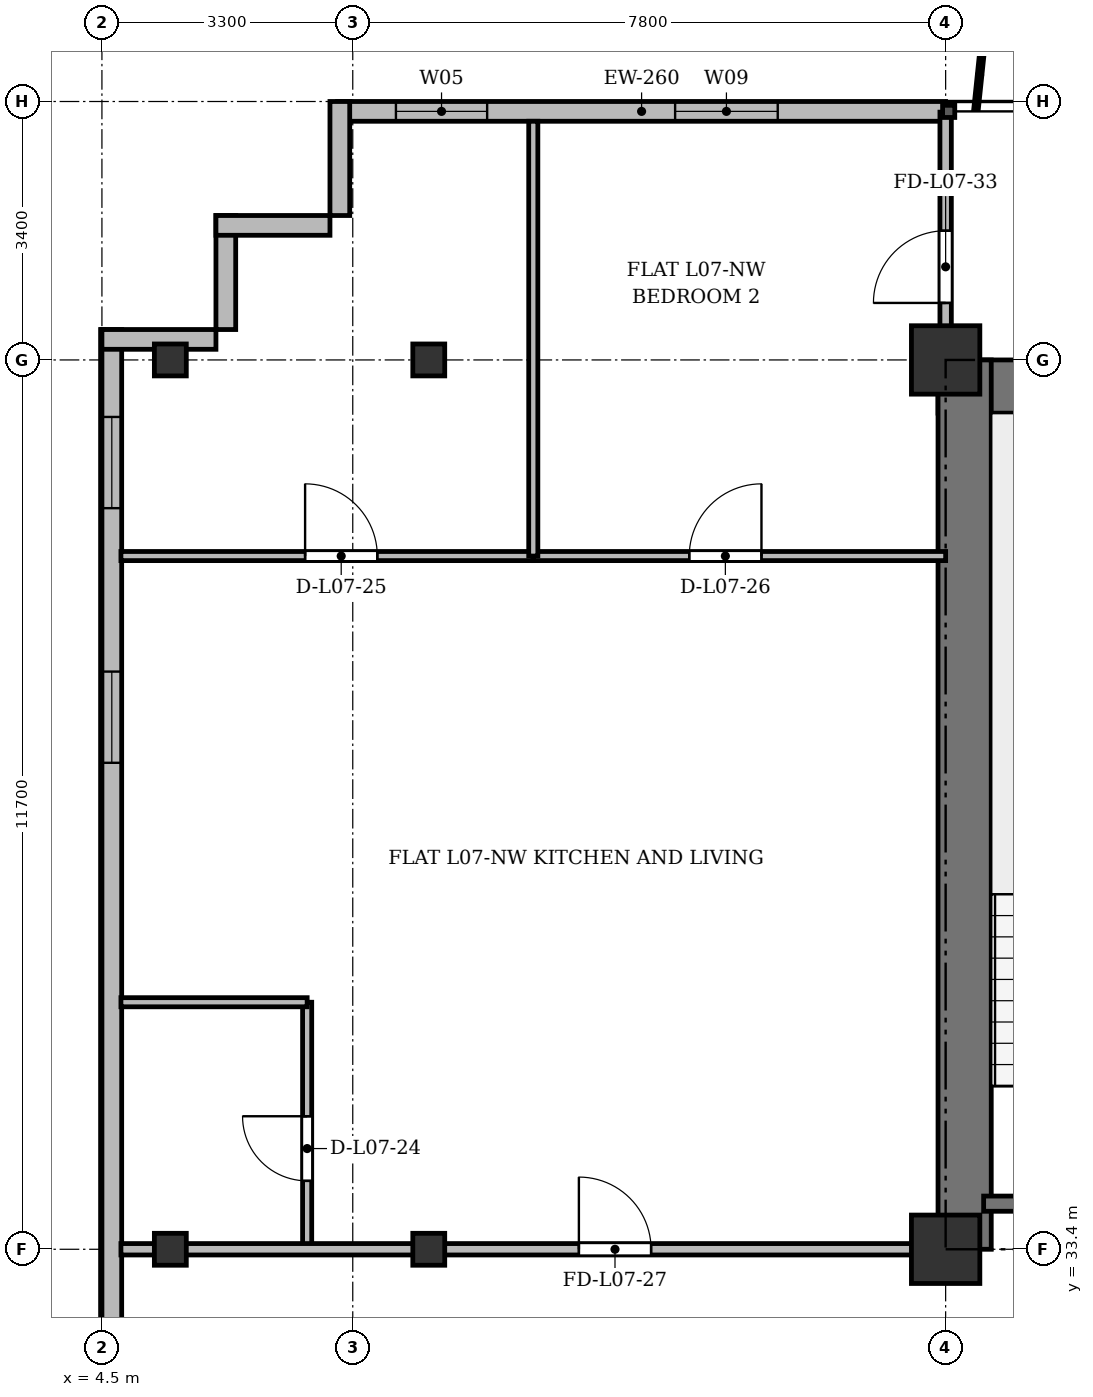
"""IFC4 building model, lengths in metres.
Left out: names, types, materials, properties, quantities, classifications, styles, units other than length and angle.
Written with IfcOpenShell. Run it as: python <this file> out.ifc"""

import sys

from ifc_helpers import new_model, si_unit, direction, frame, frame_2d, origin, origin_2d, place, context, subcontext, project, spatial, rectangle, i_section, extrude, source, transform, mapped, element, fill, save


model = new_model("IFC4")
c1 = context("Model", 3, precision=1e-05, world=origin(), true_north=direction((0.0, 1.0)))
c2 = subcontext(c1, "Body", "Model", "MODEL_VIEW")
j1 = project(units=[si_unit("LENGTHUNIT", "METRE"), si_unit("PLANEANGLEUNIT", "RADIAN")], contexts=[c1])
p1 = place(None, origin())
s1 = spatial("IfcSite", under=j1, at=p1, CompositionType="ELEMENT")
p2 = place(p1, origin())
s2 = spatial("IfcBuilding", under=s1, at=p2, CompositionType="ELEMENT")
p3 = place(p2, frame((0.0, 0.0, 30.7)))
s3 = spatial("IfcBuildingStorey", under=s2, at=p3, CompositionType="ELEMENT", Elevation=30.7)
m1 = source(origin(), c2, "Body", "SweptSolid", [
    extrude(i_section(OverallWidth=0.42, OverallDepth=0.42, WebThickness=0.026, FlangeThickness=0.04, at=origin_2d()), origin(), (0.0, 0.0, 1.0), 3.6),
])
for number, where, z_axis, x_axis in (
    (1, (5.4, 33.4, 0.0), (0.0, 0.0, 1.0), (1.0, 0.0, 0.0)),
    (2, (5.4, 45.1, 0.0), (0.0, 0.0, 1.0), (1.0, 0.0, 0.0)),
    (3, (8.8, 33.4, 0.0), (0.0, 0.0, 1.0), (1.0, 0.0, 0.0)),
    (4, (8.8, 45.1, 0.0), (0.0, 0.0, 1.0), (1.0, 0.0, 0.0)),
):
    element("IfcColumn", number, at=place(p3, frame(where, z_axis=z_axis, x_axis=x_axis)), inside=s3, PredefinedType="COLUMN", context=c2, shape_type="MappedRepresentation", body=[
        mapped(m1, transform((0.0, 0.0, 0.0), x_axis=(1.0, 0.0, 0.0), y_axis=(0.0, 1.0, 0.0), z_axis=(0.0, 0.0, 1.0), scale=1.0)),
    ])
m2 = source(origin(), c2, "Body", "SweptSolid", [
    extrude(rectangle(XDim=0.9, YDim=0.9, at=origin_2d()), origin(), (0.0, 0.0, 1.0), 3.6),
])
for number, where, z_axis, x_axis in (
    (5, (15.6, 33.4, 0.0), (0.0, 0.0, 1.0), (1.0, 0.0, 0.0)),
    (6, (15.6, 45.1, 0.0), (0.0, 0.0, 1.0), (1.0, 0.0, 0.0)),
):
    element("IfcColumn", number, at=place(p3, frame(where, z_axis=z_axis, x_axis=x_axis)), inside=s3, PredefinedType="COLUMN", context=c2, shape_type="MappedRepresentation", body=[
        mapped(m2, transform((0.0, 0.0, 0.0), x_axis=(1.0, 0.0, 0.0), y_axis=(0.0, 1.0, 0.0), z_axis=(0.0, 0.0, 1.0), scale=1.0)),
    ])
p4 = place(p3, frame((7.6, 48.37, 0.0), z_axis=(0.0, 0.0, 1.0), x_axis=(1.0, 0.0, 0.0)))
e7 = element("IfcWall", 7, at=p4, inside=s3, PredefinedType="SOLIDWALL", context=c2, shape_type="SweptSolid", body=[
    extrude(rectangle(XDim=8.0, YDim=0.26, at=frame_2d((4.0, 0.0))), origin(), (0.0, 0.0, 1.0), 3.34),
])
p5 = place(p4, frame((0.768, 0.0, 0.9)))
e8 = element("IfcOpeningElement", 8, at=p5, cuts=e7, PredefinedType="OPENING", context=c2, shape_type="SweptSolid", body=[
    extrude(rectangle(XDim=1.2, YDim=1.65, at=frame_2d((0.6, 0.825))), frame((0.0, 0.14, 0.0), z_axis=(0.0, -1.0, 0.0), x_axis=(1.0, 0.0, 0.0)), (0.0, 0.0, 1.0), 0.28),
])
p6 = place(p4, frame((4.441, 0.0, 0.9)))
e9 = element("IfcOpeningElement", 9, at=p6, cuts=e7, PredefinedType="OPENING", context=c2, shape_type="SweptSolid", body=[
    extrude(rectangle(XDim=1.35, YDim=1.5, at=frame_2d((0.675, 0.75))), frame((0.0, 0.14, 0.0), z_axis=(0.0, -1.0, 0.0), x_axis=(1.0, 0.0, 0.0)), (0.0, 0.0, 1.0), 0.28),
])
p7 = place(p3, frame((4.63, 5.9, 0.0), z_axis=(0.0, 0.0, 1.0), x_axis=(0.0, 1.0, 0.0)))
e10 = element("IfcWall", 10, at=p7, inside=s3, PredefinedType="SOLIDWALL", context=c2, shape_type="SweptSolid", body=[
    extrude(rectangle(XDim=39.6, YDim=0.26, at=frame_2d((19.8, 0.0))), origin(), (0.0, 0.0, 1.0), 3.34),
])
p8 = place(p7, frame((1.45, 0.0, 0.92)))
e11 = element("IfcOpeningElement", 11, at=p8, cuts=e10, PredefinedType="OPENING", context=c2, shape_type="SweptSolid", body=[
    extrude(rectangle(XDim=1.2, YDim=1.65, at=frame_2d((0.6, 0.825))), frame((0.0, 0.14, 0.0), z_axis=(0.0, -1.0, 0.0), x_axis=(1.0, 0.0, 0.0)), (0.0, 0.0, 1.0), 0.28),
])
p9 = place(p7, frame((4.3, 0.0, 0.92)))
e12 = element("IfcOpeningElement", 12, at=p9, cuts=e10, PredefinedType="OPENING", context=c2, shape_type="SweptSolid", body=[
    extrude(rectangle(XDim=2.4, YDim=2.1, at=frame_2d((1.2, 1.05))), frame((0.0, 0.14, 0.0), z_axis=(0.0, -1.0, 0.0), x_axis=(1.0, 0.0, 0.0)), (0.0, 0.0, 1.0), 0.28),
])
p10 = place(p7, frame((8.5, 0.0, 0.92)))
e13 = element("IfcOpeningElement", 13, at=p10, cuts=e10, PredefinedType="OPENING", context=c2, shape_type="SweptSolid", body=[
    extrude(rectangle(XDim=2.4, YDim=2.1, at=frame_2d((1.2, 1.05))), frame((0.0, 0.14, 0.0), z_axis=(0.0, -1.0, 0.0), x_axis=(1.0, 0.0, 0.0)), (0.0, 0.0, 1.0), 0.28),
])
p11 = place(p7, frame((33.9, 0.0, 0.92)))
e14 = element("IfcOpeningElement", 14, at=p11, cuts=e10, PredefinedType="OPENING", context=c2, shape_type="SweptSolid", body=[
    extrude(rectangle(XDim=1.2, YDim=1.65, at=frame_2d((0.6, 0.825))), frame((0.0, 0.14, 0.0), z_axis=(0.0, -1.0, 0.0), x_axis=(1.0, 0.0, 0.0)), (0.0, 0.0, 1.0), 0.28),
])
p12 = place(p7, frame((37.25, 0.0, 0.92)))
e15 = element("IfcOpeningElement", 15, at=p12, cuts=e10, PredefinedType="OPENING", context=c2, shape_type="SweptSolid", body=[
    extrude(rectangle(XDim=1.2, YDim=1.65, at=frame_2d((0.6, 0.825))), frame((0.0, 0.14, 0.0), z_axis=(0.0, -1.0, 0.0), x_axis=(1.0, 0.0, 0.0)), (0.0, 0.0, 1.0), 0.28),
])
p13 = place(p3, frame((4.5, 45.37, 0.0), z_axis=(0.0, 0.0, 1.0), x_axis=(1.0, 0.0, 0.0)))
e16 = element("IfcWall", 16, at=p13, inside=s3, PredefinedType="SOLIDWALL", context=c2, shape_type="SweptSolid", body=[
    extrude(rectangle(XDim=1.5, YDim=0.26, at=frame_2d((0.75, 0.0))), origin(), (0.0, 0.0, 1.0), 2.69),
])
for number, where, z_axis, x_axis in (
    (17, (6.13, 45.5, 0.0), (0.0, 0.0, 1.0), (0.0, 1.0, 0.0)),
    (18, (6.0, 46.87, 0.0), (0.0, 0.0, 1.0), (1.0, 0.0, 0.0)),
    (19, (7.63, 47.0, 0.0), (0.0, 0.0, 1.0), (0.0, 1.0, 0.0)),
):
    element("IfcWall", number, at=place(p3, frame(where, z_axis=z_axis, x_axis=x_axis)), inside=s3, PredefinedType="SOLIDWALL", context=c2, shape_type="SweptSolid", body=[
        extrude(rectangle(XDim=1.5, YDim=0.26, at=frame_2d((0.75, 0.0))), origin(), (0.0, 0.0, 1.0), 3.34),
    ])
p14 = place(p3, frame((15.5, 44.75, 0.0), z_axis=(0.0, 0.0, 1.0), x_axis=(1.0, 0.0, 0.0)))
e20 = element("IfcWall", 20, at=p14, inside=s3, PredefinedType="SHEAR", context=c2, shape_type="SweptSolid", body=[
    extrude(rectangle(XDim=43.4, YDim=0.7, at=frame_2d((21.7, 0.0))), origin(), (0.0, 0.0, 1.0), 3.34),
])
p15 = place(p3, frame((15.85, 33.4, 0.0), z_axis=(0.0, 0.0, 1.0), x_axis=(0.0, 1.0, 0.0)))
e21 = element("IfcWall", 21, at=p15, inside=s3, PredefinedType="SHEAR", context=c2, shape_type="SweptSolid", body=[
    extrude(rectangle(XDim=11.7, YDim=0.7, at=frame_2d((5.85, 0.0))), origin(), (0.0, 0.0, 1.0), 3.34),
])
p16 = place(p3, frame((16.1, 34.0, 0.0), z_axis=(0.0, 0.0, 1.0), x_axis=(1.0, 0.0, 0.0)))
e22 = element("IfcWall", 22, at=p16, inside=s3, PredefinedType="SHEAR", context=c2, shape_type="SweptSolid", body=[
    extrude(rectangle(XDim=3.4, YDim=0.2, at=frame_2d((1.7, 0.0))), origin(), (0.0, 0.0, 1.0), 3.34),
])
p17 = place(p3, frame((7.2, 33.4, 0.0), z_axis=(0.0, 0.0, 1.0), x_axis=(0.0, 1.0, 0.0)))
e23 = element("IfcWall", 23, at=p17, inside=s3, PredefinedType="PARTITIONING", context=c2, shape_type="SweptSolid", body=[
    extrude(rectangle(XDim=3.25, YDim=0.12, at=frame_2d((1.625, 0.0))), origin(), (0.0, 0.0, 1.0), 2.69),
])
p18 = place(p17, frame((0.9, 0.0, 0.0)))
e24 = element("IfcOpeningElement", 24, at=p18, cuts=e23, PredefinedType="OPENING", context=c2, shape_type="SweptSolid", body=[
    extrude(rectangle(XDim=0.85, YDim=2.1, at=frame_2d((0.425, 1.05))), frame((0.0, 0.07, 0.0), z_axis=(0.0, -1.0, 0.0), x_axis=(1.0, 0.0, 0.0)), (0.0, 0.0, 1.0), 0.14),
])
p19 = place(p3, frame((4.75, 36.65, 0.0), z_axis=(0.0, 0.0, 1.0), x_axis=(1.0, 0.0, 0.0)))
e25 = element("IfcWall", 25, at=p19, inside=s3, PredefinedType="PARTITIONING", context=c2, shape_type="SweptSolid", body=[
    extrude(rectangle(XDim=2.45, YDim=0.12, at=frame_2d((1.225, 0.0))), origin(), (0.0, 0.0, 1.0), 2.752),
])
p20 = place(p3, frame((4.75, 42.52, 0.0), z_axis=(0.0, 0.0, 1.0), x_axis=(1.0, 0.0, 0.0)))
e26 = element("IfcWall", 26, at=p20, inside=s3, PredefinedType="PARTITIONING", context=c2, shape_type="SweptSolid", body=[
    extrude(rectangle(XDim=5.425, YDim=0.12, at=frame_2d((2.712, 0.0))), origin(), (0.0, 0.0, 1.0), 2.752),
])
p21 = place(p20, frame((2.423, 0.0, 0.0)))
e27 = element("IfcOpeningElement", 27, at=p21, cuts=e26, PredefinedType="OPENING", context=c2, shape_type="SweptSolid", body=[
    extrude(rectangle(XDim=0.95, YDim=2.15, at=frame_2d((0.475, 1.075))), frame((0.0, 0.07, 0.0), z_axis=(0.0, -1.0, 0.0), x_axis=(1.0, 0.0, 0.0)), (0.0, 0.0, 1.0), 0.14),
])
p22 = place(p3, frame((10.175, 42.52, 0.0), z_axis=(0.0, 0.0, 1.0), x_axis=(1.0, 0.0, 0.0)))
e28 = element("IfcWall", 28, at=p22, inside=s3, PredefinedType="PARTITIONING", context=c2, shape_type="SweptSolid", body=[
    extrude(rectangle(XDim=5.425, YDim=0.12, at=frame_2d((2.712, 0.0))), origin(), (0.0, 0.0, 1.0), 2.752),
])
p23 = place(p22, frame((2.052, 0.0, 0.0)))
e29 = element("IfcOpeningElement", 29, at=p23, cuts=e28, PredefinedType="OPENING", context=c2, shape_type="SweptSolid", body=[
    extrude(rectangle(XDim=0.95, YDim=2.15, at=frame_2d((0.475, 1.075))), frame((0.0, 0.07, 0.0), z_axis=(0.0, -1.0, 0.0), x_axis=(1.0, 0.0, 0.0)), (0.0, 0.0, 1.0), 0.14),
])
p24 = place(p3, frame((10.175, 42.52, 0.0), z_axis=(0.0, 0.0, 1.0), x_axis=(0.0, 1.0, 0.0)))
e30 = element("IfcWall", 30, at=p24, inside=s3, PredefinedType="PARTITIONING", context=c2, shape_type="SweptSolid", body=[
    extrude(rectangle(XDim=5.72, YDim=0.12, at=frame_2d((2.86, 0.0))), origin(), (0.0, 0.0, 1.0), 2.69),
])
p25 = place(p3, frame((4.75, 33.4, 0.0), z_axis=(0.0, 0.0, 1.0), x_axis=(1.0, 0.0, 0.0)))
e31 = element("IfcWall", 31, at=p25, inside=s3, PredefinedType="PARTITIONING", context=c2, shape_type="SweptSolid", body=[
    extrude(rectangle(XDim=10.85, YDim=0.15, at=frame_2d((5.425, 0.0))), origin(), (0.0, 0.0, 1.0), 2.69),
])
p26 = place(p25, frame((6.025, 0.0, 0.0)))
e32 = element("IfcOpeningElement", 32, at=p26, cuts=e31, PredefinedType="OPENING", context=c2, shape_type="SweptSolid", body=[
    extrude(rectangle(XDim=0.95, YDim=2.15, at=frame_2d((0.475, 1.075))), frame((0.0, 0.085, 0.0), z_axis=(0.0, -1.0, 0.0), x_axis=(1.0, 0.0, 0.0)), (0.0, 0.0, 1.0), 0.17),
])
p27 = place(p3, frame((15.6, 44.75, 0.0), z_axis=(0.0, 0.0, 1.0), x_axis=(0.0, 1.0, 0.0)))
e33 = element("IfcWall", 33, at=p27, inside=s3, PredefinedType="PARTITIONING", context=c2, shape_type="SweptSolid", body=[
    extrude(rectangle(XDim=3.61, YDim=0.15, at=frame_2d((1.805, 0.0))), origin(), (0.0, 0.0, 1.0), 2.752),
])
p28 = place(p27, frame((1.1, 0.0, 0.0)))
e34 = element("IfcOpeningElement", 34, at=p28, cuts=e33, PredefinedType="OPENING", context=c2, shape_type="SweptSolid", body=[
    extrude(rectangle(XDim=0.95, YDim=2.15, at=frame_2d((0.475, 1.075))), frame((0.0, 0.085, 0.0), z_axis=(0.0, -1.0, 0.0), x_axis=(1.0, 0.0, 0.0)), (0.0, 0.0, 1.0), 0.17),
])
m3 = source(origin(), c2, "Body", "SweptSolid", [
    extrude(rectangle(XDim=1.2, YDim=1.65, at=frame_2d((0.6, 0.825))), frame((0.0, 0.03, 0.0), z_axis=(0.0, -1.0, 0.0), x_axis=(1.0, 0.0, 0.0)), (0.0, 0.0, 1.0), 0.06),
])
p29 = place(p5, origin())
e35 = element("IfcWindow", 35, at=p29, inside=s3, PartitioningType="SINGLE_PANEL", PredefinedType="WINDOW", context=c2, shape_type="MappedRepresentation", body=[
    mapped(m3, transform((0.0, 0.0, 0.0), x_axis=(1.0, 0.0, 0.0), y_axis=(0.0, 1.0, 0.0), z_axis=(0.0, 0.0, 1.0), scale=1.0)),
])
fill(e8, e35)
m4 = source(origin(), c2, "Body", "SweptSolid", [
    extrude(rectangle(XDim=1.35, YDim=1.5, at=frame_2d((0.675, 0.75))), frame((0.0, 0.03, 0.0), z_axis=(0.0, -1.0, 0.0), x_axis=(1.0, 0.0, 0.0)), (0.0, 0.0, 1.0), 0.06),
])
p30 = place(p6, origin())
e36 = element("IfcWindow", 36, at=p30, inside=s3, PartitioningType="SINGLE_PANEL", PredefinedType="WINDOW", context=c2, shape_type="MappedRepresentation", body=[
    mapped(m4, transform((0.0, 0.0, 0.0), x_axis=(1.0, 0.0, 0.0), y_axis=(0.0, 1.0, 0.0), z_axis=(0.0, 0.0, 1.0), scale=1.0)),
])
fill(e9, e36)
p31 = place(p11, origin())
e37 = element("IfcWindow", 37, at=p31, inside=s3, PartitioningType="SINGLE_PANEL", PredefinedType="WINDOW", context=c2, shape_type="MappedRepresentation", body=[
    mapped(m3, transform((0.0, 0.0, 0.0), x_axis=(1.0, 0.0, 0.0), y_axis=(0.0, 1.0, 0.0), z_axis=(0.0, 0.0, 1.0), scale=1.0)),
])
fill(e14, e37)
p32 = place(p12, origin())
e38 = element("IfcWindow", 38, at=p32, inside=s3, PartitioningType="SINGLE_PANEL", PredefinedType="WINDOW", context=c2, shape_type="MappedRepresentation", body=[
    mapped(m3, transform((0.0, 0.0, 0.0), x_axis=(1.0, 0.0, 0.0), y_axis=(0.0, 1.0, 0.0), z_axis=(0.0, 0.0, 1.0), scale=1.0)),
])
fill(e15, e38)
m5 = source(origin(), c2, "Body", "SweptSolid", [
    extrude(rectangle(XDim=0.85, YDim=2.1, at=frame_2d((0.425, 1.05))), frame((0.0, 0.025, 0.0), z_axis=(0.0, -1.0, 0.0), x_axis=(1.0, 0.0, 0.0)), (0.0, 0.0, 1.0), 0.05),
])
p33 = place(p18, origin())
e39 = element("IfcDoor", 39, at=p33, inside=s3, OperationType="SINGLE_SWING_RIGHT", PredefinedType="DOOR", context=c2, shape_type="MappedRepresentation", body=[
    mapped(m5, transform((0.0, 0.0, 0.0), x_axis=(1.0, 0.0, 0.0), y_axis=(0.0, 1.0, 0.0), z_axis=(0.0, 0.0, 1.0), scale=1.0)),
])
fill(e24, e39)
m6 = source(origin(), c2, "Body", "SweptSolid", [
    extrude(rectangle(XDim=0.95, YDim=2.15, at=frame_2d((0.475, 1.075))), frame((0.0, 0.025, 0.0), z_axis=(0.0, -1.0, 0.0), x_axis=(1.0, 0.0, 0.0)), (0.0, 0.0, 1.0), 0.05),
])
p34 = place(p21, origin())
e40 = element("IfcDoor", 40, at=p34, inside=s3, OperationType="SINGLE_SWING_LEFT", PredefinedType="DOOR", context=c2, shape_type="MappedRepresentation", body=[
    mapped(m6, transform((0.0, 0.0, 0.0), x_axis=(1.0, 0.0, 0.0), y_axis=(0.0, 1.0, 0.0), z_axis=(0.0, 0.0, 1.0), scale=1.0)),
])
fill(e27, e40)
p35 = place(p23, origin())
e41 = element("IfcDoor", 41, at=p35, inside=s3, OperationType="SINGLE_SWING_RIGHT", PredefinedType="DOOR", context=c2, shape_type="MappedRepresentation", body=[
    mapped(m6, transform((0.0, 0.0, 0.0), x_axis=(1.0, 0.0, 0.0), y_axis=(0.0, 1.0, 0.0), z_axis=(0.0, 0.0, 1.0), scale=1.0)),
])
fill(e29, e41)
p36 = place(p26, origin())
e42 = element("IfcDoor", 42, at=p36, inside=s3, OperationType="SINGLE_SWING_LEFT", PredefinedType="DOOR", context=c2, shape_type="MappedRepresentation", body=[
    mapped(m6, transform((0.0, 0.0, 0.0), x_axis=(1.0, 0.0, 0.0), y_axis=(0.0, 1.0, 0.0), z_axis=(0.0, 0.0, 1.0), scale=1.0)),
])
fill(e32, e42)
p37 = place(p28, origin())
e43 = element("IfcDoor", 43, at=p37, inside=s3, OperationType="SINGLE_SWING_LEFT", PredefinedType="DOOR", context=c2, shape_type="MappedRepresentation", body=[
    mapped(m6, transform((0.0, 0.0, 0.0), x_axis=(1.0, 0.0, 0.0), y_axis=(0.0, 1.0, 0.0), z_axis=(0.0, 0.0, 1.0), scale=1.0)),
])
fill(e34, e43)
save(model, sys.argv[1])
